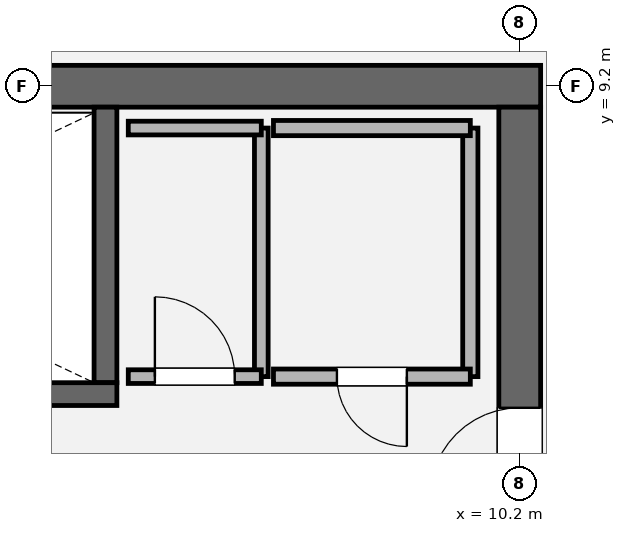
"""IFC4 building model, lengths in metres.
Left out: names, types, materials, properties, quantities, classifications, styles, units other than length and angle.
Written with IfcOpenShell. Run it as: python <this file> out.ifc"""

import sys

from ifc_helpers import new_model, si_unit, direction, frame, frame_2d, origin, place, context, subcontext, project, spatial, rectangle, extrude, element, fill, save


model = new_model("IFC4")
c1 = context("Model", 3, precision=1e-05, world=origin(), true_north=direction((0.0, 1.0)))
c2 = subcontext(c1, "Body", "Model", "MODEL_VIEW")
j1 = project(units=[si_unit("LENGTHUNIT", "METRE"), si_unit("PLANEANGLEUNIT", "RADIAN")], contexts=[c1])
p1 = place(None, origin())
s1 = spatial("IfcSite", under=j1, at=p1, CompositionType="ELEMENT")
p2 = place(p1, origin())
s2 = spatial("IfcBuilding", under=s1, at=p2, CompositionType="ELEMENT")
p3 = place(p2, frame((0.0, 0.0, 267.6)))
s3 = spatial("IfcBuildingStorey", under=s2, at=p3, CompositionType="ELEMENT", Elevation=267.6)
p4 = place(p3, frame((-10.475, 9.2, 0.0), z_axis=(0.0, 0.0, 1.0), x_axis=(1.0, 0.0, 0.0)))
e1 = element("IfcWall", 1, at=p4, inside=s3, PredefinedType="SHEAR", context=c2, shape_type="SweptSolid", body=[
    extrude(rectangle(XDim=20.95, YDim=0.55, at=frame_2d((10.475, 0.0))), origin(), (0.0, 0.0, 1.0), 4.05),
])
p5 = place(p3, frame((10.2, 8.925, 0.0), z_axis=(0.0, 0.0, 1.0), x_axis=(0.0, -1.0, 0.0)))
e2 = element("IfcWall", 2, at=p5, inside=s3, PredefinedType="SHEAR", context=c2, shape_type="SweptSolid", body=[
    extrude(rectangle(XDim=17.85, YDim=0.55, at=frame_2d((8.925, 0.0))), origin(), (0.0, 0.0, 1.0), 4.05),
])
p6 = place(p5, frame((3.955, 0.0, 0.0)))
e3 = element("IfcOpeningElement", 3, at=p6, cuts=e2, PredefinedType="OPENING", context=c2, shape_type="SweptSolid", body=[
    extrude(rectangle(XDim=1.18, YDim=2.2, at=frame_2d((0.59, 1.1))), frame((0.0, 0.285, 0.0), z_axis=(0.0, -1.0, 0.0), x_axis=(1.0, 0.0, 0.0)), (0.0, 0.0, 1.0), 0.57),
])
p7 = place(p3, frame((4.75, 8.925, 0.0), z_axis=(0.0, 0.0, 1.0), x_axis=(0.0, -1.0, 0.0)))
e4 = element("IfcWall", 4, at=p7, inside=s3, PredefinedType="SOLIDWALL", context=c2, shape_type="SweptSolid", body=[
    extrude(rectangle(XDim=3.625, YDim=0.3, at=frame_2d((1.812, 0.0))), origin(), (0.0, 0.0, 1.0), 4.05),
])
p8 = place(p3, frame((-4.9, 5.15, 0.0), z_axis=(0.0, 0.0, 1.0), x_axis=(1.0, 0.0, 0.0)))
e5 = element("IfcWall", 5, at=p8, inside=s3, PredefinedType="SOLIDWALL", context=c2, shape_type="SweptSolid", body=[
    extrude(rectangle(XDim=9.8, YDim=0.3, at=frame_2d((4.9, 0.0))), origin(), (0.0, 0.0, 1.0), 4.05),
])
p9 = place(p8, frame((0.56, 0.0, 0.0)))
e6 = element("IfcOpeningElement", 6, at=p9, cuts=e5, PredefinedType="OPENING", context=c2, shape_type="SweptSolid", body=[
    extrude(rectangle(XDim=1.18, YDim=2.2, at=frame_2d((0.59, 1.1))), frame((0.0, 0.16, 0.0), z_axis=(0.0, -1.0, 0.0), x_axis=(1.0, 0.0, 0.0)), (0.0, 0.0, 1.0), 0.32),
])
p10 = place(p3, frame((6.8, 5.38, 0.0), z_axis=(0.0, 0.0, 1.0), x_axis=(0.0, 1.0, 0.0)))
e7 = element("IfcWall", 7, at=p10, inside=s3, PredefinedType="PARTITIONING", context=c2, shape_type="SweptSolid", body=[
    extrude(rectangle(XDim=3.27, YDim=0.18, at=frame_2d((1.635, 0.0))), origin(), (0.0, 0.0, 1.0), 3.85),
])
p11 = place(p3, frame((6.8, 8.65, 0.0), z_axis=(0.0, 0.0, 1.0), x_axis=(-1.0, 0.0, 0.0)))
e8 = element("IfcWall", 8, at=p11, inside=s3, PredefinedType="PARTITIONING", context=c2, shape_type="SweptSolid", body=[
    extrude(rectangle(XDim=1.75, YDim=0.18, at=frame_2d((0.875, 0.0))), origin(), (0.0, 0.0, 1.0), 3.85),
])
p12 = place(p3, frame((5.05, 5.38, 0.0), z_axis=(0.0, 0.0, 1.0), x_axis=(1.0, 0.0, 0.0)))
e9 = element("IfcWall", 9, at=p12, inside=s3, PredefinedType="PARTITIONING", context=c2, shape_type="SweptSolid", body=[
    extrude(rectangle(XDim=1.75, YDim=0.18, at=frame_2d((0.875, 0.0))), origin(), (0.0, 0.0, 1.0), 3.85),
])
p13 = place(p12, frame((0.35, 0.0, 0.0)))
e10 = element("IfcOpeningElement", 10, at=p13, cuts=e9, PredefinedType="OPENING", context=c2, shape_type="SweptSolid", body=[
    extrude(rectangle(XDim=1.05, YDim=2.2, at=frame_2d((0.525, 1.1))), frame((0.0, 0.1, 0.0), z_axis=(0.0, -1.0, 0.0), x_axis=(1.0, 0.0, 0.0)), (0.0, 0.0, 1.0), 0.2),
])
p14 = place(p3, frame((9.55, 5.38, 0.0), z_axis=(0.0, 0.0, 1.0), x_axis=(0.0, 1.0, 0.0)))
e11 = element("IfcWall", 11, at=p14, inside=s3, PredefinedType="SOLIDWALL", context=c2, shape_type="SweptSolid", body=[
    extrude(rectangle(XDim=3.27, YDim=0.2, at=frame_2d((1.635, 0.0))), origin(), (0.0, 0.0, 1.0), 3.85),
])
p15 = place(p3, frame((9.55, 8.65, 0.0), z_axis=(0.0, 0.0, 1.0), x_axis=(-1.0, 0.0, 0.0)))
e12 = element("IfcWall", 12, at=p15, inside=s3, PredefinedType="SOLIDWALL", context=c2, shape_type="SweptSolid", body=[
    extrude(rectangle(XDim=2.59, YDim=0.2, at=frame_2d((1.295, 0.0))), origin(), (0.0, 0.0, 1.0), 3.85),
])
p16 = place(p3, frame((6.96, 5.38, 0.0), z_axis=(0.0, 0.0, 1.0), x_axis=(1.0, 0.0, 0.0)))
e13 = element("IfcWall", 13, at=p16, inside=s3, PredefinedType="SOLIDWALL", context=c2, shape_type="SweptSolid", body=[
    extrude(rectangle(XDim=2.59, YDim=0.2, at=frame_2d((1.295, 0.0))), origin(), (0.0, 0.0, 1.0), 3.85),
])
p17 = place(p16, frame((0.835, 0.0, 0.0)))
e14 = element("IfcOpeningElement", 14, at=p17, cuts=e13, PredefinedType="OPENING", context=c2, shape_type="SweptSolid", body=[
    extrude(rectangle(XDim=0.92, YDim=2.1, at=frame_2d((0.46, 1.05))), frame((0.0, 0.11, 0.0), z_axis=(0.0, -1.0, 0.0), x_axis=(1.0, 0.0, 0.0)), (0.0, 0.0, 1.0), 0.22),
])
p18 = place(p6, origin())
e15 = element("IfcDoor", 15, at=p18, inside=s3, OperationType="SINGLE_SWING_RIGHT", PredefinedType="DOOR", context=c2, shape_type="SweptSolid", body=[
    extrude(rectangle(XDim=1.18, YDim=2.2, at=frame_2d((0.59, 1.1))), frame((0.0, 0.025, 0.0), z_axis=(0.0, -1.0, 0.0), x_axis=(1.0, 0.0, 0.0)), (0.0, 0.0, 1.0), 0.05),
])
fill(e3, e15)
p19 = place(p13, origin())
e16 = element("IfcDoor", 16, at=p19, inside=s3, OperationType="SINGLE_SWING_LEFT", PredefinedType="DOOR", context=c2, shape_type="SweptSolid", body=[
    extrude(rectangle(XDim=1.05, YDim=2.2, at=frame_2d((0.525, 1.1))), frame((0.0, 0.025, 0.0), z_axis=(0.0, -1.0, 0.0), x_axis=(1.0, 0.0, 0.0)), (0.0, 0.0, 1.0), 0.05),
])
fill(e10, e16)
p20 = place(p17, origin())
e17 = element("IfcDoor", 17, at=p20, inside=s3, OperationType="SINGLE_SWING_RIGHT", PredefinedType="DOOR", context=c2, shape_type="SweptSolid", body=[
    extrude(rectangle(XDim=0.92, YDim=2.1, at=frame_2d((0.46, 1.05))), frame((0.0, 0.025, 0.0), z_axis=(0.0, -1.0, 0.0), x_axis=(1.0, 0.0, 0.0)), (0.0, 0.0, 1.0), 0.05),
])
fill(e14, e17)
save(model, sys.argv[1])
